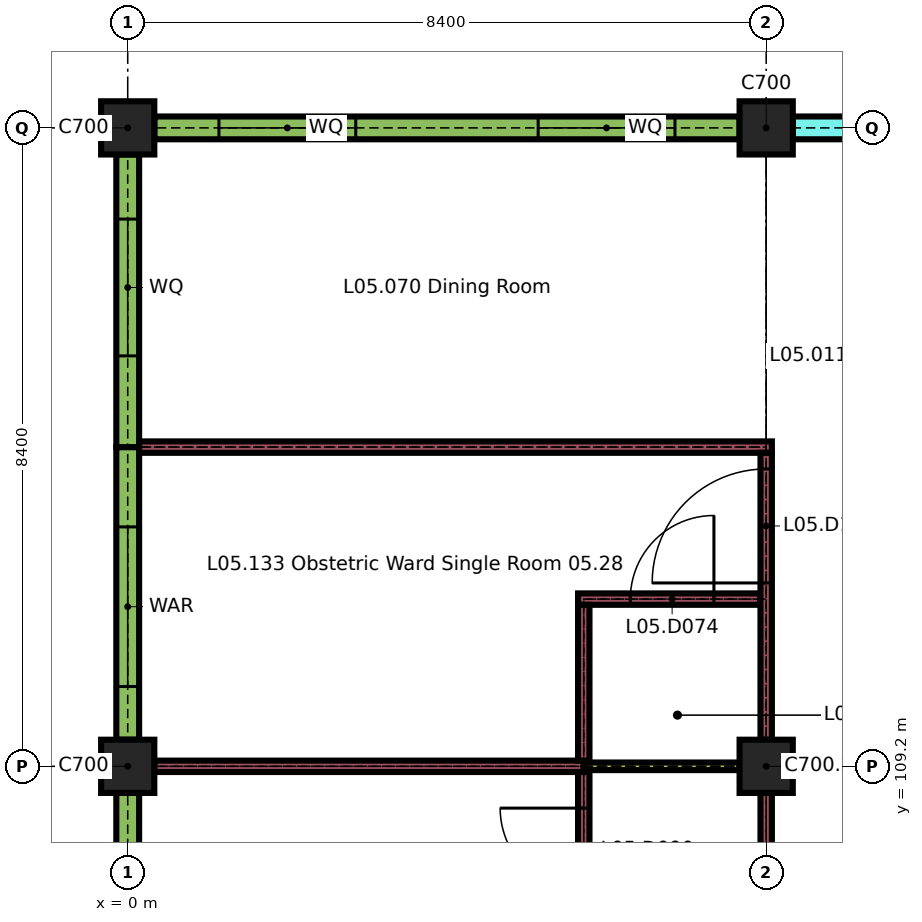
"""IFC4 building model, lengths in metres.
Left out: names, types, materials, properties, quantities, classifications, styles, units other than length and angle.
Written with IfcOpenShell. Run it as: python <this file> out.ifc"""

import sys

from ifc_helpers import new_model, si_unit, direction, frame, frame_2d, origin, origin_2d, place, context, subcontext, project, spatial, rectangle, extrude, element, fill, save


model = new_model("IFC4")
c1 = context("Model", 3, precision=1e-05, world=origin(), true_north=direction((0.0, 1.0)))
c2 = subcontext(c1, "Body", "Model", "MODEL_VIEW")
j1 = project(units=[si_unit("LENGTHUNIT", "METRE"), si_unit("PLANEANGLEUNIT", "RADIAN")], contexts=[c1])
p1 = place(None, origin())
s1 = spatial("IfcSite", under=j1, at=p1, CompositionType="ELEMENT")
p2 = place(p1, origin())
s2 = spatial("IfcBuilding", under=s1, at=p2, CompositionType="ELEMENT")
p3 = place(p2, frame((0.0, 0.0, 22.5)))
s3 = spatial("IfcBuildingStorey", under=s2, at=p3, CompositionType="ELEMENT", Elevation=22.5)
for number, where, z_axis, x_axis in (
    (1, (0.0, 109.2, 0.0), (0.0, 0.0, 1.0), (1.0, 0.0, 0.0)),
    (2, (8.4, 109.2, 0.0), (0.0, 0.0, 1.0), (1.0, 0.0, 0.0)),
    (3, (0.0, 117.6, 0.0), (0.0, 0.0, 1.0), (1.0, 0.0, 0.0)),
    (4, (8.4, 117.6, 0.0), (0.0, 0.0, 1.0), (1.0, 0.0, 0.0)),
):
    element("IfcColumn", number, at=place(p3, frame(where, z_axis=z_axis, x_axis=x_axis)), inside=s3, PredefinedType="COLUMN", context=c2, shape_type="SweptSolid", body=[
        extrude(rectangle(XDim=0.7, YDim=0.7, at=origin_2d()), origin(), (0.0, 0.0, 1.0), 3.26),
    ])
p4 = place(p3, frame((0.35, 117.6, 0.0), z_axis=(0.0, 0.0, 1.0), x_axis=(1.0, 0.0, 0.0)))
e5 = element("IfcWall", 5, at=p4, inside=s3, PredefinedType="SOLIDWALL", context=c2, shape_type="SweptSolid", body=[
    extrude(rectangle(XDim=7.7, YDim=0.3, at=frame_2d((3.85, 0.0))), origin(), (0.0, 0.0, 1.0), 2.96),
])
p5 = place(p4, frame((0.85, 0.0, 1.05)))
e6 = element("IfcOpeningElement", 6, at=p5, cuts=e5, PredefinedType="OPENING", context=c2, shape_type="SweptSolid", body=[
    extrude(rectangle(XDim=1.8, YDim=1.2, at=frame_2d((0.9, 0.6))), frame((0.0, 0.16, 0.0), z_axis=(0.0, -1.0, 0.0), x_axis=(1.0, 0.0, 0.0)), (0.0, 0.0, 1.0), 0.32),
])
p6 = place(p4, frame((5.05, 0.0, 1.05)))
e7 = element("IfcOpeningElement", 7, at=p6, cuts=e5, PredefinedType="OPENING", context=c2, shape_type="SweptSolid", body=[
    extrude(rectangle(XDim=1.8, YDim=1.2, at=frame_2d((0.9, 0.6))), frame((0.0, 0.16, 0.0), z_axis=(0.0, -1.0, 0.0), x_axis=(1.0, 0.0, 0.0)), (0.0, 0.0, 1.0), 0.32),
])
p7 = place(p3, frame((8.75, 117.6, 0.0), z_axis=(0.0, 0.0, 1.0), x_axis=(1.0, 0.0, 0.0)))
e8 = element("IfcWall", 8, at=p7, inside=s3, PredefinedType="SOLIDWALL", context=c2, shape_type="SweptSolid", body=[
    extrude(rectangle(XDim=2.65, YDim=0.3, at=frame_2d((1.325, 0.0))), origin(), (0.0, 0.0, 1.0), 3.26),
])
p8 = place(p7, frame((1.3, 0.0, 0.9)))
e9 = element("IfcOpeningElement", 9, at=p8, cuts=e8, PredefinedType="OPENING", context=c2, shape_type="SweptSolid", body=[
    extrude(rectangle(XDim=0.9, YDim=1.5, at=frame_2d((0.45, 0.75))), frame((0.0, 0.16, 0.0), z_axis=(0.0, -1.0, 0.0), x_axis=(1.0, 0.0, 0.0)), (0.0, 0.0, 1.0), 0.32),
])
p9 = place(p3, frame((0.0, 105.0, 0.0), z_axis=(0.0, 0.0, 1.0), x_axis=(0.0, 1.0, 0.0)))
e10 = element("IfcWall", 10, at=p9, inside=s3, PredefinedType="SOLIDWALL", context=c2, shape_type="SweptSolid", body=[
    extrude(rectangle(XDim=3.85, YDim=0.3, at=frame_2d((1.925, 0.0))), origin(), (0.0, 0.0, 1.0), 2.96),
])
p10 = place(p9, frame((1.05, 0.0, 0.9)))
e11 = element("IfcOpeningElement", 11, at=p10, cuts=e10, PredefinedType="OPENING", context=c2, shape_type="SweptSolid", body=[
    extrude(rectangle(XDim=2.1, YDim=1.5, at=frame_2d((1.05, 0.75))), frame((0.0, 0.16, 0.0), z_axis=(0.0, -1.0, 0.0), x_axis=(1.0, 0.0, 0.0)), (0.0, 0.0, 1.0), 0.32),
])
p11 = place(p3, frame((0.0, 109.55, 0.0), z_axis=(0.0, 0.0, 1.0), x_axis=(0.0, 1.0, 0.0)))
e12 = element("IfcWall", 12, at=p11, inside=s3, PredefinedType="SOLIDWALL", context=c2, shape_type="SweptSolid", body=[
    extrude(rectangle(XDim=3.85, YDim=0.3, at=frame_2d((1.925, 0.0))), origin(), (0.0, 0.0, 1.0), 2.96),
])
p12 = place(p11, frame((0.7, 0.0, 0.9)))
e13 = element("IfcOpeningElement", 13, at=p12, cuts=e12, PredefinedType="OPENING", context=c2, shape_type="SweptSolid", body=[
    extrude(rectangle(XDim=2.1, YDim=1.5, at=frame_2d((1.05, 0.75))), frame((0.0, 0.16, 0.0), z_axis=(0.0, -1.0, 0.0), x_axis=(1.0, 0.0, 0.0)), (0.0, 0.0, 1.0), 0.32),
])
p13 = place(p3, frame((0.0, 113.4, 0.0), z_axis=(0.0, 0.0, 1.0), x_axis=(0.0, 1.0, 0.0)))
e14 = element("IfcWall", 14, at=p13, inside=s3, PredefinedType="SOLIDWALL", context=c2, shape_type="SweptSolid", body=[
    extrude(rectangle(XDim=3.85, YDim=0.3, at=frame_2d((1.925, 0.0))), origin(), (0.0, 0.0, 1.0), 2.96),
])
p14 = place(p13, frame((1.2, 0.0, 1.05)))
e15 = element("IfcOpeningElement", 15, at=p14, cuts=e14, PredefinedType="OPENING", context=c2, shape_type="SweptSolid", body=[
    extrude(rectangle(XDim=1.8, YDim=1.2, at=frame_2d((0.9, 0.6))), frame((0.0, 0.16, 0.0), z_axis=(0.0, -1.0, 0.0), x_axis=(1.0, 0.0, 0.0)), (0.0, 0.0, 1.0), 0.32),
])
p15 = place(p3, frame((0.35, 109.2, 0.0), z_axis=(0.0, 0.0, 1.0), x_axis=(1.0, 0.0, 0.0)))
e16 = element("IfcWall", 16, at=p15, inside=s3, PredefinedType="PARTITIONING", context=c2, shape_type="SweptSolid", body=[
    extrude(rectangle(XDim=5.65, YDim=0.15, at=frame_2d((2.825, 0.0))), origin(), (0.0, 0.0, 1.0), 3.26),
])
p16 = place(p3, frame((6.0, 109.2, 0.0), z_axis=(0.0, 0.0, 1.0), x_axis=(1.0, 0.0, 0.0)))
e17 = element("IfcWall", 17, at=p16, inside=s3, PredefinedType="PARTITIONING", context=c2, shape_type="SweptSolid", body=[
    extrude(rectangle(XDim=2.05, YDim=0.1, at=frame_2d((1.025, 0.0))), origin(), (0.0, 0.0, 1.0), 3.26),
])
p17 = place(p3, frame((5.925, 111.4, 0.0), z_axis=(0.0, 0.0, 1.0), x_axis=(1.0, 0.0, 0.0)))
e18 = element("IfcWall", 18, at=p17, inside=s3, PredefinedType="PARTITIONING", context=c2, shape_type="SweptSolid", body=[
    extrude(rectangle(XDim=2.4, YDim=0.15, at=frame_2d((1.2, 0.0))), origin(), (0.0, 0.0, 1.0), 3.26),
])
p18 = place(p17, frame((0.688, 0.0, 0.0)))
e19 = element("IfcOpeningElement", 19, at=p18, cuts=e18, PredefinedType="OPENING", context=c2, shape_type="SweptSolid", body=[
    extrude(rectangle(XDim=1.1, YDim=2.1, at=frame_2d((0.55, 1.05))), frame((0.0, 0.085, 0.0), z_axis=(0.0, -1.0, 0.0), x_axis=(1.0, 0.0, 0.0)), (0.0, 0.0, 1.0), 0.17),
])
p19 = place(p3, frame((0.15, 113.4, 0.0), z_axis=(0.0, 0.0, 1.0), x_axis=(1.0, 0.0, 0.0)))
e20 = element("IfcWall", 20, at=p19, inside=s3, PredefinedType="PARTITIONING", context=c2, shape_type="SweptSolid", body=[
    extrude(rectangle(XDim=8.325, YDim=0.15, at=frame_2d((4.163, 0.0))), origin(), (0.0, 0.0, 1.0), 3.26),
])
p20 = place(p3, frame((6.0, 107.075, 0.0), z_axis=(0.0, 0.0, 1.0), x_axis=(0.0, 1.0, 0.0)))
e21 = element("IfcWall", 21, at=p20, inside=s3, PredefinedType="PARTITIONING", context=c2, shape_type="SweptSolid", body=[
    extrude(rectangle(XDim=2.05, YDim=0.15, at=frame_2d((1.025, 0.0))), origin(), (0.0, 0.0, 1.0), 3.26),
])
p21 = place(p20, frame((0.475, 0.0, 0.0)))
e22 = element("IfcOpeningElement", 22, at=p21, cuts=e21, PredefinedType="OPENING", context=c2, shape_type="SweptSolid", body=[
    extrude(rectangle(XDim=1.1, YDim=2.1, at=frame_2d((0.55, 1.05))), frame((0.0, 0.085, 0.0), z_axis=(0.0, -1.0, 0.0), x_axis=(1.0, 0.0, 0.0)), (0.0, 0.0, 1.0), 0.17),
])
p22 = place(p3, frame((6.0, 109.275, 0.0), z_axis=(0.0, 0.0, 1.0), x_axis=(0.0, 1.0, 0.0)))
e23 = element("IfcWall", 23, at=p22, inside=s3, PredefinedType="PARTITIONING", context=c2, shape_type="SweptSolid", body=[
    extrude(rectangle(XDim=2.05, YDim=0.15, at=frame_2d((1.025, 0.0))), origin(), (0.0, 0.0, 1.0), 3.26),
])
p23 = place(p3, frame((8.4, 101.15, 0.0), z_axis=(0.0, 0.0, 1.0), x_axis=(0.0, 1.0, 0.0)))
e24 = element("IfcWall", 24, at=p23, inside=s3, PredefinedType="PARTITIONING", context=c2, shape_type="SweptSolid", body=[
    extrude(rectangle(XDim=7.7, YDim=0.15, at=frame_2d((3.85, 0.0))), origin(), (0.0, 0.0, 1.0), 3.26),
])
p24 = place(p23, frame((2.1, 0.0, 0.0)))
e25 = element("IfcOpeningElement", 25, at=p24, cuts=e24, PredefinedType="OPENING", context=c2, shape_type="SweptSolid", body=[
    extrude(rectangle(XDim=1.5, YDim=2.4, at=frame_2d((0.75, 1.2))), frame((0.0, 0.085, 0.0), z_axis=(0.0, -1.0, 0.0), x_axis=(1.0, 0.0, 0.0)), (0.0, 0.0, 1.0), 0.17),
])
p25 = place(p23, frame((4.1, 0.0, 0.0)))
e26 = element("IfcOpeningElement", 26, at=p25, cuts=e24, PredefinedType="OPENING", context=c2, shape_type="SweptSolid", body=[
    extrude(rectangle(XDim=1.5, YDim=2.4, at=frame_2d((0.75, 1.2))), frame((0.0, 0.085, 0.0), z_axis=(0.0, -1.0, 0.0), x_axis=(1.0, 0.0, 0.0)), (0.0, 0.0, 1.0), 0.17),
])
p26 = place(p3, frame((8.4, 109.55, 0.0), z_axis=(0.0, 0.0, 1.0), x_axis=(0.0, 1.0, 0.0)))
e27 = element("IfcWall", 27, at=p26, inside=s3, PredefinedType="PARTITIONING", context=c2, shape_type="SweptSolid", body=[
    extrude(rectangle(XDim=3.775, YDim=0.15, at=frame_2d((1.887, 0.0))), origin(), (0.0, 0.0, 1.0), 3.26),
])
p27 = place(p26, frame((2.062, 0.0, 0.0)))
e28 = element("IfcOpeningElement", 28, at=p27, cuts=e27, PredefinedType="OPENING", context=c2, shape_type="SweptSolid", body=[
    extrude(rectangle(XDim=1.5, YDim=2.4, at=frame_2d((0.75, 1.2))), frame((0.0, 0.085, 0.0), z_axis=(0.0, -1.0, 0.0), x_axis=(1.0, 0.0, 0.0)), (0.0, 0.0, 1.0), 0.17),
])
p28 = place(p5, origin())
e29 = element("IfcWindow", 29, at=p28, inside=s3, PartitioningType="DOUBLE_PANEL_VERTICAL", PredefinedType="WINDOW", context=c2, shape_type="SweptSolid", body=[
    extrude(rectangle(XDim=1.8, YDim=1.2, at=frame_2d((0.9, 0.6))), frame((0.0, 0.03, 0.0), z_axis=(0.0, -1.0, 0.0), x_axis=(1.0, 0.0, 0.0)), (0.0, 0.0, 1.0), 0.06),
])
fill(e6, e29)
p29 = place(p6, origin())
e30 = element("IfcWindow", 30, at=p29, inside=s3, PartitioningType="DOUBLE_PANEL_VERTICAL", PredefinedType="WINDOW", context=c2, shape_type="SweptSolid", body=[
    extrude(rectangle(XDim=1.8, YDim=1.2, at=frame_2d((0.9, 0.6))), frame((0.0, 0.03, 0.0), z_axis=(0.0, -1.0, 0.0), x_axis=(1.0, 0.0, 0.0)), (0.0, 0.0, 1.0), 0.06),
])
fill(e7, e30)
p30 = place(p12, origin())
e31 = element("IfcWindow", 31, at=p30, inside=s3, PartitioningType="DOUBLE_PANEL_VERTICAL", PredefinedType="WINDOW", context=c2, shape_type="SweptSolid", body=[
    extrude(rectangle(XDim=2.1, YDim=1.5, at=frame_2d((1.05, 0.75))), frame((0.0, 0.05, 0.0), z_axis=(0.0, -1.0, 0.0), x_axis=(1.0, 0.0, 0.0)), (0.0, 0.0, 1.0), 0.1),
])
fill(e13, e31)
p31 = place(p14, origin())
e32 = element("IfcWindow", 32, at=p31, inside=s3, PartitioningType="DOUBLE_PANEL_VERTICAL", PredefinedType="WINDOW", context=c2, shape_type="SweptSolid", body=[
    extrude(rectangle(XDim=1.8, YDim=1.2, at=frame_2d((0.9, 0.6))), frame((0.0, 0.03, 0.0), z_axis=(0.0, -1.0, 0.0), x_axis=(1.0, 0.0, 0.0)), (0.0, 0.0, 1.0), 0.06),
])
fill(e15, e32)
p32 = place(p18, origin())
e33 = element("IfcDoor", 33, at=p32, inside=s3, OperationType="SINGLE_SWING_LEFT", PredefinedType="DOOR", context=c2, shape_type="SweptSolid", body=[
    extrude(rectangle(XDim=1.1, YDim=2.1, at=frame_2d((0.55, 1.05))), frame((0.0, 0.025, 0.0), z_axis=(0.0, -1.0, 0.0), x_axis=(1.0, 0.0, 0.0)), (0.0, 0.0, 1.0), 0.05),
])
fill(e19, e33)
p33 = place(p21, origin())
e34 = element("IfcDoor", 34, at=p33, inside=s3, OperationType="SINGLE_SWING_LEFT", PredefinedType="DOOR", context=c2, shape_type="SweptSolid", body=[
    extrude(rectangle(XDim=1.1, YDim=2.1, at=frame_2d((0.55, 1.05))), frame((0.0, 0.025, 0.0), z_axis=(0.0, -1.0, 0.0), x_axis=(1.0, 0.0, 0.0)), (0.0, 0.0, 1.0), 0.05),
])
fill(e22, e34)
p34 = place(p27, origin())
e35 = element("IfcDoor", 35, at=p34, inside=s3, OperationType="SINGLE_SWING_RIGHT", PredefinedType="DOOR", context=c2, shape_type="SweptSolid", body=[
    extrude(rectangle(XDim=1.5, YDim=2.4, at=frame_2d((0.75, 1.2))), frame((0.0, 0.03, 0.0), z_axis=(0.0, -1.0, 0.0), x_axis=(1.0, 0.0, 0.0)), (0.0, 0.0, 1.0), 0.06),
])
fill(e28, e35)
save(model, sys.argv[1])
